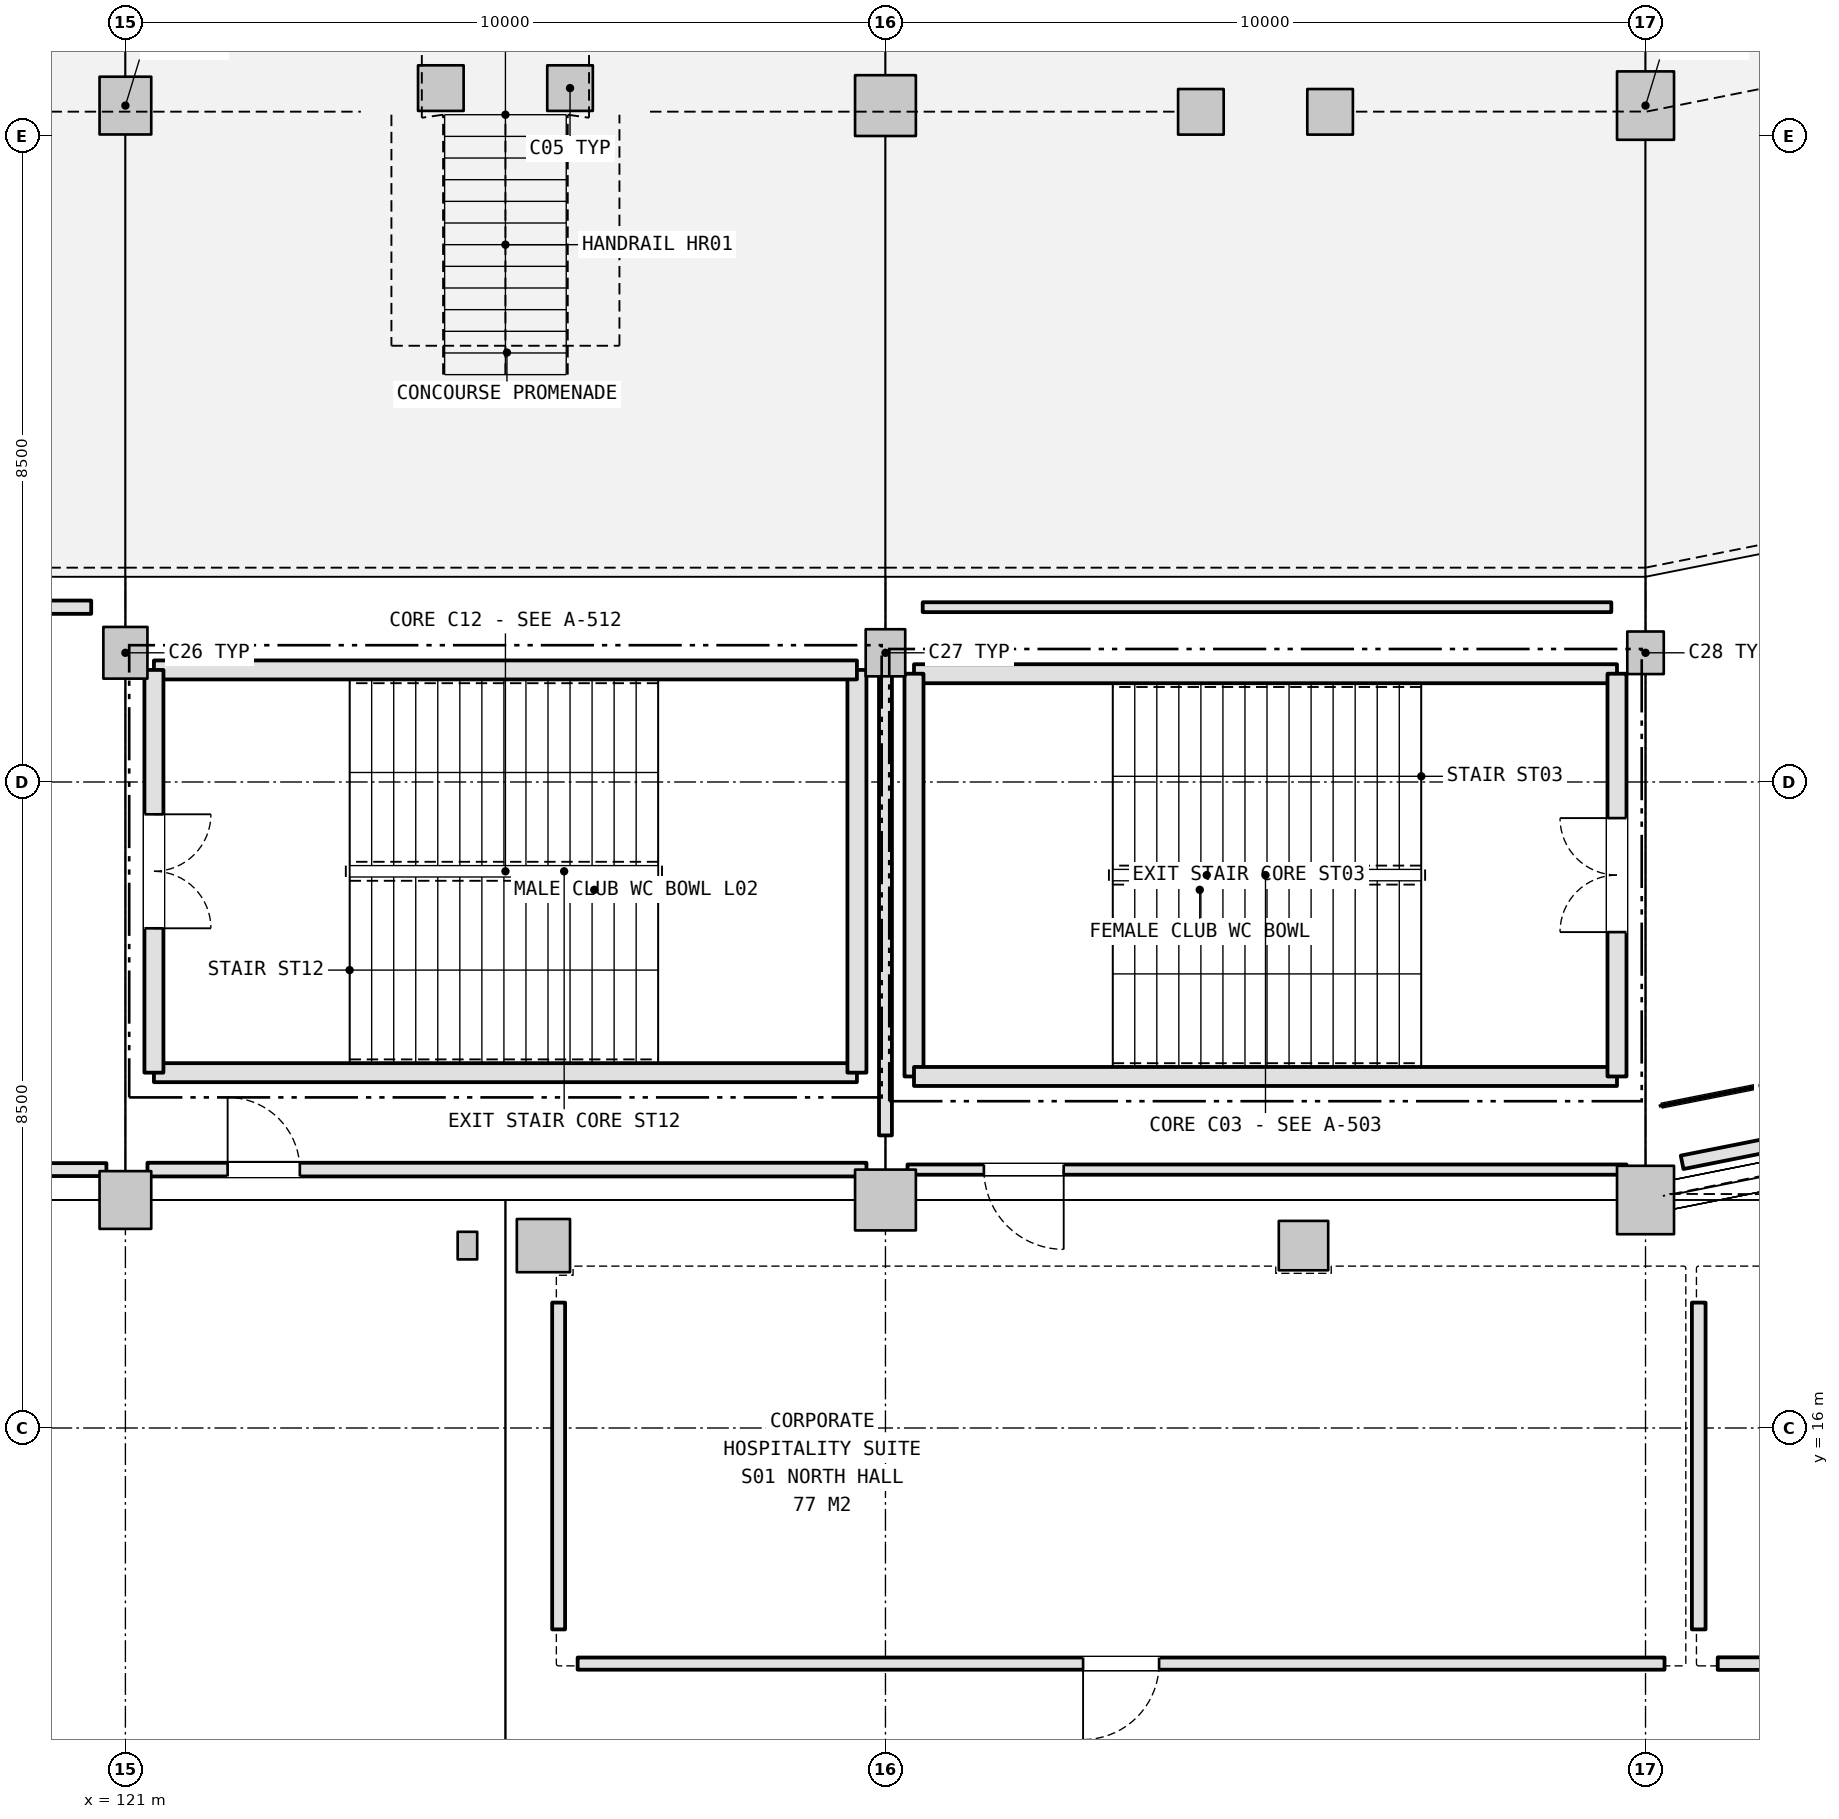
"""IFC4 building model, lengths in metres.
Left out: names, types, materials, properties, quantities, classifications, styles, units other than length and angle.
Written with IfcOpenShell. Run it as: python <this file> out.ifc"""

import sys

from ifc_helpers import new_model, si_unit, direction, frame, frame_2d, origin, origin_2d, place, context, subcontext, project, spatial, rectangle, i_section, extrude, element, fill, save


model = new_model("IFC4")
c1 = context("Model", 3, precision=1e-05, world=origin(), true_north=direction((0.0, 1.0)))
c2 = subcontext(c1, "Body", "Model", "MODEL_VIEW")
j1 = project(units=[si_unit("LENGTHUNIT", "METRE"), si_unit("PLANEANGLEUNIT", "RADIAN")], contexts=[c1])
p1 = place(None, origin())
s1 = spatial("IfcSite", under=j1, at=p1, CompositionType="ELEMENT")
p2 = place(p1, origin())
s2 = spatial("IfcBuilding", under=s1, at=p2, CompositionType="ELEMENT")
p3 = place(p2, frame((0.0, 0.0, 10.8)))
s3 = spatial("IfcBuildingStorey", under=s2, at=p3, CompositionType="ELEMENT", Elevation=10.8)
p4 = place(p3, frame((121.0, 33.4, 0.0), z_axis=(0.0, 0.0, 1.0), x_axis=(1.0, 0.0, 0.0)))
e1 = element("IfcColumn", 1, at=p4, inside=s3, PredefinedType="COLUMN", context=c2, shape_type="SweptSolid", body=[
    extrude(rectangle(XDim=0.68, YDim=0.76, at=origin_2d()), origin(), (0.0, 0.0, 1.0), 5.4),
])
p5 = place(p3, frame((121.0, 26.2, 0.0), z_axis=(0.0, 0.0, 1.0), x_axis=(1.0, 0.0, 0.0)))
e2 = element("IfcColumn", 2, at=p5, inside=s3, PredefinedType="COLUMN", context=c2, shape_type="SweptSolid", body=[
    extrude(rectangle(XDim=0.58, YDim=0.68, at=origin_2d()), origin(), (0.0, 0.0, 1.0), 5.4),
])
p6 = place(p3, frame((121.0, 19.0, 0.0), z_axis=(0.0, 0.0, 1.0), x_axis=(1.0, 0.0, 0.0)))
e3 = element("IfcColumn", 3, at=p6, inside=s3, PredefinedType="COLUMN", context=c2, shape_type="SweptSolid", body=[
    extrude(rectangle(XDim=0.68, YDim=0.76, at=origin_2d()), origin(), (0.0, 0.0, 1.0), 5.4),
])
p7 = place(p3, frame((131.0, 33.4, 0.0), z_axis=(0.0, 0.0, 1.0), x_axis=(1.0, 0.0, 0.0)))
e4 = element("IfcColumn", 4, at=p7, inside=s3, PredefinedType="COLUMN", context=c2, shape_type="SweptSolid", body=[
    extrude(rectangle(XDim=0.8, YDim=0.8, at=origin_2d()), origin(), (0.0, 0.0, 1.0), 5.4),
])
p8 = place(p3, frame((131.0, 26.2, 0.0), z_axis=(0.0, 0.0, 1.0), x_axis=(1.0, 0.0, 0.0)))
e5 = element("IfcColumn", 5, at=p8, inside=s3, PredefinedType="COLUMN", context=c2, shape_type="SweptSolid", body=[
    extrude(rectangle(XDim=0.52, YDim=0.62, at=origin_2d()), origin(), (0.0, 0.0, 1.0), 5.4),
])
p9 = place(p3, frame((131.0, 19.0, 0.0), z_axis=(0.0, 0.0, 1.0), x_axis=(1.0, 0.0, 0.0)))
e6 = element("IfcColumn", 6, at=p9, inside=s3, PredefinedType="COLUMN", context=c2, shape_type="SweptSolid", body=[
    extrude(rectangle(XDim=0.8, YDim=0.8, at=origin_2d()), origin(), (0.0, 0.0, 1.0), 5.4),
])
p10 = place(p3, frame((141.0, 33.4, 0.0), z_axis=(0.0, 0.0, 1.0), x_axis=(1.0, 0.0, 0.0)))
e7 = element("IfcColumn", 7, at=p10, inside=s3, PredefinedType="COLUMN", context=c2, shape_type="SweptSolid", body=[
    extrude(rectangle(XDim=0.75, YDim=0.9, at=origin_2d()), origin(), (0.0, 0.0, 1.0), 5.4),
])
p11 = place(p3, frame((141.0, 26.2, 0.0), z_axis=(0.0, 0.0, 1.0), x_axis=(1.0, 0.0, 0.0)))
e8 = element("IfcColumn", 8, at=p11, inside=s3, PredefinedType="COLUMN", context=c2, shape_type="SweptSolid", body=[
    extrude(rectangle(XDim=0.48, YDim=0.56, at=origin_2d()), origin(), (0.0, 0.0, 1.0), 5.4),
])
p12 = place(p3, frame((141.0, 19.0, 0.0), z_axis=(0.0, 0.0, 1.0), x_axis=(1.0, 0.0, 0.0)))
e9 = element("IfcColumn", 9, at=p12, inside=s3, PredefinedType="COLUMN", context=c2, shape_type="SweptSolid", body=[
    extrude(rectangle(XDim=0.75, YDim=0.9, at=origin_2d()), origin(), (0.0, 0.0, 1.0), 5.4),
])
p13 = place(p3, frame((126.5, 18.4, 0.0), z_axis=(0.0, 0.0, 1.0), x_axis=(1.0, 0.0, 0.0)))
e10 = element("IfcColumn", 10, at=p13, inside=s3, PredefinedType="COLUMN", context=c2, shape_type="SweptSolid", body=[
    extrude(rectangle(XDim=0.7, YDim=0.7, at=origin_2d()), origin(), (0.0, 0.0, 1.0), 5.4),
])
p14 = place(p3, frame((136.5, 18.4, 0.0), z_axis=(0.0, 0.0, 1.0), x_axis=(1.0, 0.0, 0.0)))
e11 = element("IfcColumn", 11, at=p14, inside=s3, PredefinedType="COLUMN", context=c2, shape_type="SweptSolid", body=[
    extrude(rectangle(XDim=0.65, YDim=0.65, at=origin_2d()), origin(), (0.0, 0.0, 1.0), 5.4),
])
p15 = place(p3, frame((125.5, 18.4, 0.0), z_axis=(0.0, 0.0, 1.0), x_axis=(1.0, 0.0, 0.0)))
e12 = element("IfcColumn", 12, at=p15, inside=s3, PredefinedType="COLUMN", context=c2, shape_type="SweptSolid", body=[
    extrude(i_section(OverallWidth=0.257, OverallDepth=0.363, WebThickness=0.013, FlangeThickness=0.022, FilletRadius=0.015, at=origin_2d()), origin(), (0.0, 0.0, 1.0), 5.4),
])
p16 = place(p3, frame((140.625, 25.925, 0.0), z_axis=(0.0, 0.0, 1.0), x_axis=(-1.0, 0.0, 0.0)))
e13 = element("IfcWall", 13, at=p16, inside=s3, PredefinedType="SHEAR", context=c2, shape_type="SweptSolid", body=[
    extrude(rectangle(XDim=9.249, YDim=0.25, at=frame_2d((4.625, 0.0))), origin(), (0.0, 0.0, 1.0), 5.15),
])
p17 = place(p3, frame((131.375, 25.925, 0.0), z_axis=(0.0, 0.0, 1.0), x_axis=(0.0, -1.0, 0.0)))
e14 = element("IfcWall", 14, at=p17, inside=s3, PredefinedType="SHEAR", context=c2, shape_type="SweptSolid", body=[
    extrude(rectangle(XDim=5.299, YDim=0.25, at=frame_2d((2.649, 0.0))), origin(), (0.0, 0.0, 1.0), 5.15),
])
p18 = place(p3, frame((131.375, 20.625, 0.0), z_axis=(0.0, 0.0, 1.0), x_axis=(1.0, 0.0, 0.0)))
e15 = element("IfcWall", 15, at=p18, inside=s3, PredefinedType="SHEAR", context=c2, shape_type="SweptSolid", body=[
    extrude(rectangle(XDim=9.249, YDim=0.25, at=frame_2d((4.625, 0.0))), origin(), (0.0, 0.0, 1.0), 5.15),
])
p19 = place(p3, frame((140.625, 20.625, 0.0), z_axis=(0.0, 0.0, 1.0), x_axis=(0.0, 1.0, 0.0)))
e16 = element("IfcWall", 16, at=p19, inside=s3, PredefinedType="SHEAR", context=c2, shape_type="SweptSolid", body=[
    extrude(rectangle(XDim=5.299, YDim=0.25, at=frame_2d((2.649, 0.0))), origin(), (0.0, 0.0, 1.0), 5.15),
])
p20 = place(p19, frame((1.9, 0.0, 0.0)))
e17 = element("IfcOpeningElement", 17, at=p20, cuts=e16, PredefinedType="OPENING", context=c2, shape_type="SweptSolid", body=[
    extrude(rectangle(XDim=1.5, YDim=2.2, at=frame_2d((0.75, 1.1))), frame((0.0, 0.135, 0.0), z_axis=(0.0, -1.0, 0.0), x_axis=(1.0, 0.0, 0.0)), (0.0, 0.0, 1.0), 0.27),
])
p21 = place(p3, frame((121.375, 20.675, 0.0), z_axis=(0.0, 0.0, 1.0), x_axis=(1.0, 0.0, 0.0)))
e18 = element("IfcWall", 18, at=p21, inside=s3, PredefinedType="SHEAR", context=c2, shape_type="SweptSolid", body=[
    extrude(rectangle(XDim=9.249, YDim=0.25, at=frame_2d((4.625, 0.0))), origin(), (0.0, 0.0, 1.0), 5.15),
])
p22 = place(p3, frame((130.625, 20.675, 0.0), z_axis=(0.0, 0.0, 1.0), x_axis=(0.0, 1.0, 0.0)))
e19 = element("IfcWall", 19, at=p22, inside=s3, PredefinedType="SHEAR", context=c2, shape_type="SweptSolid", body=[
    extrude(rectangle(XDim=5.299, YDim=0.25, at=frame_2d((2.65, 0.0))), origin(), (0.0, 0.0, 1.0), 5.15),
])
p23 = place(p3, frame((130.625, 25.975, 0.0), z_axis=(0.0, 0.0, 1.0), x_axis=(-1.0, 0.0, 0.0)))
e20 = element("IfcWall", 20, at=p23, inside=s3, PredefinedType="SHEAR", context=c2, shape_type="SweptSolid", body=[
    extrude(rectangle(XDim=9.249, YDim=0.25, at=frame_2d((4.625, 0.0))), origin(), (0.0, 0.0, 1.0), 5.15),
])
p24 = place(p3, frame((121.375, 25.975, 0.0), z_axis=(0.0, 0.0, 1.0), x_axis=(0.0, -1.0, 0.0)))
e21 = element("IfcWall", 21, at=p24, inside=s3, PredefinedType="SHEAR", context=c2, shape_type="SweptSolid", body=[
    extrude(rectangle(XDim=5.299, YDim=0.25, at=frame_2d((2.65, 0.0))), origin(), (0.0, 0.0, 1.0), 5.15),
])
p25 = place(p24, frame((1.9, 0.0, 0.0)))
e22 = element("IfcOpeningElement", 22, at=p25, cuts=e21, PredefinedType="OPENING", context=c2, shape_type="SweptSolid", body=[
    extrude(rectangle(XDim=1.5, YDim=2.2, at=frame_2d((0.75, 1.1))), frame((0.0, 0.135, 0.0), z_axis=(0.0, -1.0, 0.0), x_axis=(1.0, 0.0, 0.0)), (0.0, 0.0, 1.0), 0.27),
])
for number, where, z_axis, x_axis in (
    (23, (126.85, 33.63, 0.0), (0.0, 0.0, 1.0), (1.0, 0.0, 0.0)),
    (24, (125.15, 33.63, 0.0), (0.0, 0.0, 1.0), (1.0, 0.0, 0.0)),
):
    element("IfcColumn", number, at=place(p3, frame(where, z_axis=z_axis, x_axis=x_axis)), inside=s3, PredefinedType="COLUMN", context=c2, shape_type="SweptSolid", body=[
        extrude(rectangle(XDim=0.6, YDim=0.6, at=origin_2d()), origin(), (0.0, 0.0, 1.0), 2.04),
    ])
for number, where, z_axis, x_axis in (
    (25, (136.85, 33.318, 0.0), (0.0, 0.0, 1.0), (1.0, 0.0, 0.0)),
    (26, (135.15, 33.318, 0.0), (0.0, 0.0, 1.0), (1.0, 0.0, 0.0)),
):
    element("IfcColumn", number, at=place(p3, frame(where, z_axis=z_axis, x_axis=x_axis)), inside=s3, PredefinedType="COLUMN", context=c2, shape_type="SweptSolid", body=[
        extrude(rectangle(XDim=0.6, YDim=0.6, at=origin_2d()), origin(), (0.0, 0.0, 1.0), 5.4),
    ])
p26 = place(p3, frame((141.25, 12.9, 0.0), z_axis=(0.0, 0.0, 1.0), x_axis=(-1.0, 0.0, 0.0)))
e27 = element("IfcWall", 27, at=p26, inside=s3, PredefinedType="PARTITIONING", context=c2, shape_type="SweptSolid", body=[
    extrude(rectangle(XDim=14.3, YDim=0.16, at=frame_2d((7.15, 0.0))), origin(), (0.0, 0.0, 1.0), 4.435),
])
p27 = place(p26, frame((6.65, 0.0, 0.0)))
e28 = element("IfcOpeningElement", 28, at=p27, cuts=e27, PredefinedType="OPENING", context=c2, shape_type="SweptSolid", body=[
    extrude(rectangle(XDim=1.0, YDim=2.1, at=frame_2d((0.5, 1.05))), frame((0.0, 0.09, 0.0), z_axis=(0.0, -1.0, 0.0), x_axis=(1.0, 0.0, 0.0)), (0.0, 0.0, 1.0), 0.18),
])
p28 = place(p3, frame((126.7, 13.35, 0.0), z_axis=(0.0, 0.0, 1.0), x_axis=(0.0, 1.0, 0.0)))
e29 = element("IfcWall", 29, at=p28, inside=s3, PredefinedType="PARTITIONING", context=c2, shape_type="SweptSolid", body=[
    extrude(rectangle(XDim=4.3, YDim=0.17, at=frame_2d((2.15, 0.0))), origin(), (0.0, 0.0, 1.0), 4.485),
])
p29 = place(p3, frame((156.25, 12.9, 0.0), z_axis=(0.0, 0.0, 1.0), x_axis=(-1.0, 0.0, 0.0)))
e30 = element("IfcWall", 30, at=p29, inside=s3, PredefinedType="PARTITIONING", context=c2, shape_type="SweptSolid", body=[
    extrude(rectangle(XDim=14.3, YDim=0.165, at=frame_2d((7.15, 0.0))), origin(), (0.0, 0.0, 1.0), 4.435),
])
p30 = place(p29, frame((6.2, 0.0, 0.0)))
e31 = element("IfcOpeningElement", 31, at=p30, cuts=e30, PredefinedType="OPENING", context=c2, shape_type="SweptSolid", body=[
    extrude(rectangle(XDim=1.9, YDim=2.3, at=frame_2d((0.95, 1.15))), frame((0.0, 0.093, 0.0), z_axis=(0.0, -1.0, 0.0), x_axis=(1.0, 0.0, 0.0)), (0.0, 0.0, 1.0), 0.185),
])
p31 = place(p3, frame((141.7, 13.35, 0.0), z_axis=(0.0, 0.0, 1.0), x_axis=(0.0, 1.0, 0.0)))
e32 = element("IfcWall", 32, at=p31, inside=s3, PredefinedType="PARTITIONING", context=c2, shape_type="SweptSolid", body=[
    extrude(rectangle(XDim=4.3, YDim=0.18, at=frame_2d((2.15, 0.0))), origin(), (0.0, 0.0, 1.0), 4.635),
])
p32 = place(p3, frame((120.75, 19.4, 0.0), z_axis=(0.0, 0.0, 1.0), x_axis=(-1.0, 0.0, 0.0)))
e33 = element("IfcWall", 33, at=p32, inside=s3, PredefinedType="PARTITIONING", context=c2, shape_type="SweptSolid", body=[
    extrude(rectangle(XDim=9.46, YDim=0.17, at=frame_2d((4.73, 0.0))), origin(), (0.0, 0.0, 1.0), 4.255),
])
p33 = place(p32, frame((2.63, 0.0, 0.0)))
e34 = element("IfcOpeningElement", 34, at=p33, cuts=e33, PredefinedType="OPENING", context=c2, shape_type="SweptSolid", body=[
    extrude(rectangle(XDim=1.8, YDim=2.2, at=frame_2d((0.9, 1.1))), frame((0.0, 0.095, 0.0), z_axis=(0.0, -1.0, 0.0), x_axis=(1.0, 0.0, 0.0)), (0.0, 0.0, 1.0), 0.19),
])
p34 = place(p3, frame((111.49, 26.8, 0.0), z_axis=(0.0, 0.0, 1.0), x_axis=(1.0, 0.0, 0.0)))
e35 = element("IfcWall", 35, at=p34, inside=s3, PredefinedType="PARTITIONING", context=c2, shape_type="SweptSolid", body=[
    extrude(rectangle(XDim=9.06, YDim=0.175, at=frame_2d((4.53, 0.0))), origin(), (0.0, 0.0, 1.0), 5.12),
])
p35 = place(p3, frame((130.75, 19.4, 0.0), z_axis=(0.0, 0.0, 1.0), x_axis=(-1.0, 0.0, 0.0)))
e36 = element("IfcWall", 36, at=p35, inside=s3, PredefinedType="PARTITIONING", context=c2, shape_type="SweptSolid", body=[
    extrude(rectangle(XDim=9.46, YDim=0.18, at=frame_2d((4.73, 0.0))), origin(), (0.0, 0.0, 1.0), 4.215),
])
p36 = place(p35, frame((7.455, 0.0, 0.0)))
e37 = element("IfcOpeningElement", 37, at=p36, cuts=e36, PredefinedType="OPENING", context=c2, shape_type="SweptSolid", body=[
    extrude(rectangle(XDim=0.95, YDim=2.15, at=frame_2d((0.475, 1.075))), frame((0.0, 0.1, 0.0), z_axis=(0.0, -1.0, 0.0), x_axis=(1.0, 0.0, 0.0)), (0.0, 0.0, 1.0), 0.2),
])
p37 = place(p3, frame((131.0, 26.35, 0.0), z_axis=(0.0, 0.0, 1.0), x_axis=(0.0, -1.0, 0.0)))
e38 = element("IfcWall", 38, at=p37, inside=s3, PredefinedType="PARTITIONING", context=c2, shape_type="SweptSolid", body=[
    extrude(rectangle(XDim=6.5, YDim=0.17, at=frame_2d((3.25, 0.0))), origin(), (0.0, 0.0, 1.0), 4.215),
])
p38 = place(p3, frame((140.75, 19.4, 0.0), z_axis=(0.0, 0.0, 1.0), x_axis=(-1.0, 0.0, 0.0)))
e39 = element("IfcWall", 39, at=p38, inside=s3, PredefinedType="PARTITIONING", context=c2, shape_type="SweptSolid", body=[
    extrude(rectangle(XDim=9.46, YDim=0.135, at=frame_2d((4.73, 0.0))), origin(), (0.0, 0.0, 1.0), 4.215),
])
p39 = place(p38, frame((7.405, 0.0, 0.0)))
e40 = element("IfcOpeningElement", 40, at=p39, cuts=e39, PredefinedType="OPENING", context=c2, shape_type="SweptSolid", body=[
    extrude(rectangle(XDim=1.05, YDim=2.2, at=frame_2d((0.525, 1.1))), frame((0.0, 0.077, 0.0), z_axis=(0.0, -1.0, 0.0), x_axis=(1.0, 0.0, 0.0)), (0.0, 0.0, 1.0), 0.155),
])
p40 = place(p3, frame((131.49, 26.8, 0.0), z_axis=(0.0, 0.0, 1.0), x_axis=(1.0, 0.0, 0.0)))
e41 = element("IfcWall", 41, at=p40, inside=s3, PredefinedType="PARTITIONING", context=c2, shape_type="SweptSolid", body=[
    extrude(rectangle(XDim=9.06, YDim=0.13, at=frame_2d((4.53, 0.0))), origin(), (0.0, 0.0, 1.0), 5.12),
])
p41 = place(p3, frame((160.305, 23.24, 0.0), z_axis=(0.0, 0.0, 1.0), x_axis=(-0.98078659802, -0.195083697793, 0.0)))
e42 = element("IfcWall", 42, at=p41, inside=s3, PredefinedType="PARTITIONING", context=c2, shape_type="SweptSolid", body=[
    extrude(rectangle(XDim=19.192, YDim=0.18, at=frame_2d((9.596, 0.0))), origin(), (0.0, 0.0, 1.0), 5.12),
])
p42 = place(p20, origin())
e43 = element("IfcDoor", 43, at=p42, inside=s3, OperationType="DOUBLE_DOOR_SINGLE_SWING", PredefinedType="DOOR", context=c2, shape_type="SweptSolid", body=[
    extrude(rectangle(XDim=1.5, YDim=2.2, at=frame_2d((0.75, 1.1))), frame((0.0, 0.025, 0.0), z_axis=(0.0, -1.0, 0.0), x_axis=(1.0, 0.0, 0.0)), (0.0, 0.0, 1.0), 0.05),
])
fill(e17, e43)
p43 = place(p25, origin())
e44 = element("IfcDoor", 44, at=p43, inside=s3, OperationType="DOUBLE_DOOR_SINGLE_SWING", PredefinedType="DOOR", context=c2, shape_type="SweptSolid", body=[
    extrude(rectangle(XDim=1.5, YDim=2.2, at=frame_2d((0.75, 1.1))), frame((0.0, 0.025, 0.0), z_axis=(0.0, -1.0, 0.0), x_axis=(1.0, 0.0, 0.0)), (0.0, 0.0, 1.0), 0.05),
])
fill(e22, e44)
p44 = place(p27, origin())
e45 = element("IfcDoor", 45, at=p44, inside=s3, OperationType="SINGLE_SWING_RIGHT", PredefinedType="DOOR", context=c2, shape_type="SweptSolid", body=[
    extrude(rectangle(XDim=1.0, YDim=2.1, at=frame_2d((0.5, 1.05))), frame((0.0, 0.025, 0.0), z_axis=(0.0, -1.0, 0.0), x_axis=(1.0, 0.0, 0.0)), (0.0, 0.0, 1.0), 0.05),
])
fill(e28, e45)
p45 = place(p36, frame((0.95, 0.0, 0.0), z_axis=(0.0, 0.0, 1.0), x_axis=(-1.0, 0.0, 0.0)))
e46 = element("IfcDoor", 46, at=p45, inside=s3, OperationType="SINGLE_SWING_RIGHT", PredefinedType="DOOR", context=c2, shape_type="SweptSolid", body=[
    extrude(rectangle(XDim=0.95, YDim=2.15, at=frame_2d((0.475, 1.075))), frame((0.0, 0.025, 0.0), z_axis=(0.0, -1.0, 0.0), x_axis=(1.0, 0.0, 0.0)), (0.0, 0.0, 1.0), 0.05),
])
fill(e37, e46)
p46 = place(p39, origin())
e47 = element("IfcDoor", 47, at=p46, inside=s3, OperationType="SINGLE_SWING_LEFT", PredefinedType="DOOR", context=c2, shape_type="SweptSolid", body=[
    extrude(rectangle(XDim=1.05, YDim=2.2, at=frame_2d((0.525, 1.1))), frame((0.0, 0.025, 0.0), z_axis=(0.0, -1.0, 0.0), x_axis=(1.0, 0.0, 0.0)), (0.0, 0.0, 1.0), 0.05),
])
fill(e40, e47)
save(model, sys.argv[1])
